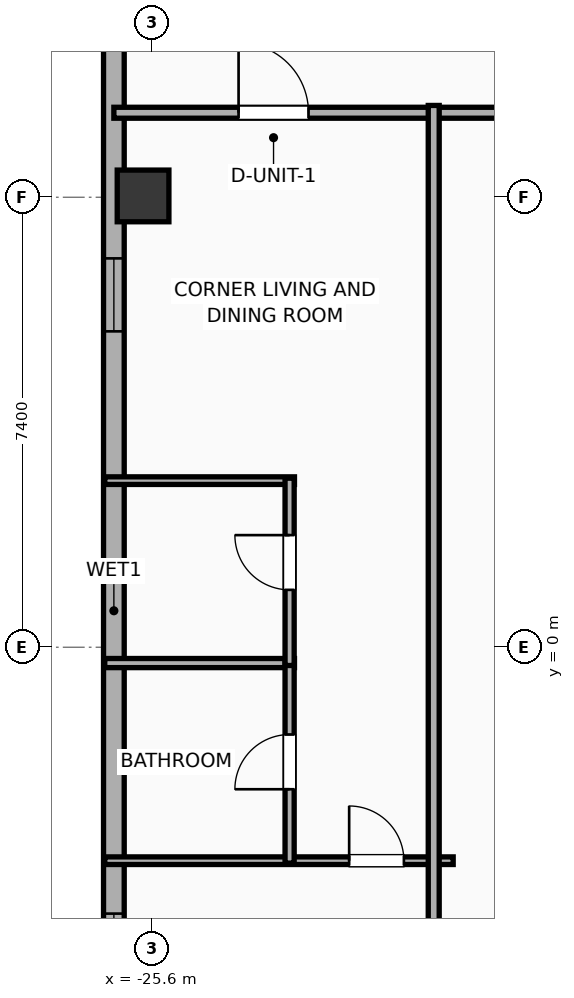
"""IFC4 building model, lengths in metres.
Left out: names, types, materials, properties, quantities, classifications, styles, units other than length and angle.
Written with IfcOpenShell. Run it as: python <this file> out.ifc"""

import sys

from ifc_helpers import new_model, si_unit, direction, frame, frame_2d, origin, origin_2d, place, context, subcontext, project, spatial, rectangle, hollow_rectangle, extrude, element, fill, save


model = new_model("IFC4")
c1 = context("Model", 3, precision=1e-05, world=origin(), true_north=direction((0.0, 1.0)))
c2 = subcontext(c1, "Body", "Model", "MODEL_VIEW")
j1 = project(units=[si_unit("LENGTHUNIT", "METRE"), si_unit("PLANEANGLEUNIT", "RADIAN")], contexts=[c1])
p1 = place(None, origin())
s1 = spatial("IfcSite", under=j1, at=p1, CompositionType="ELEMENT")
p2 = place(p1, origin())
s2 = spatial("IfcBuilding", under=s1, at=p2, CompositionType="ELEMENT")
p3 = place(p2, frame((0.0, 0.0, 208.0)))
s3 = spatial("IfcBuildingStorey", under=s2, at=p3, CompositionType="ELEMENT", Elevation=208.0)
p4 = place(p3, frame((-25.75, 7.422, 0.0), z_axis=(0.0, 0.0, 1.0), x_axis=(1.0, 0.0, 0.0)))
e1 = element("IfcColumn", 1, at=p4, inside=s3, PredefinedType="COLUMN", context=c2, shape_type="SweptSolid", body=[
    extrude(hollow_rectangle(XDim=0.85, YDim=0.85, WallThickness=0.028, at=origin_2d()), origin(), (0.0, 0.0, 1.0), 3.9),
])
p5 = place(p3, frame((-26.23, -15.383, 0.0), z_axis=(0.0, 0.0, 1.0), x_axis=(0.0, 1.0, 0.0)))
e2 = element("IfcWall", 2, at=p5, inside=s3, PredefinedType="ELEMENTEDWALL", context=c2, shape_type="SweptSolid", body=[
    extrude(rectangle(XDim=31.967, YDim=0.34, at=frame_2d((15.983, 0.0))), origin(), (0.0, 0.0, 1.0), 3.65),
])
p6 = place(p5, frame((29.415, 0.0, 0.75)))
e3 = element("IfcOpeningElement", 3, at=p6, cuts=e2, PredefinedType="OPENING", context=c2, shape_type="SweptSolid", body=[
    extrude(rectangle(XDim=1.2, YDim=2.05, at=frame_2d((0.6, 1.025))), frame((0.0, 0.18, 0.0), z_axis=(0.0, -1.0, 0.0), x_axis=(1.0, 0.0, 0.0)), (0.0, 0.0, 1.0), 0.36),
])
p7 = place(p5, frame((20.578, 0.0, 0.75)))
e4 = element("IfcOpeningElement", 4, at=p7, cuts=e2, PredefinedType="OPENING", context=c2, shape_type="SweptSolid", body=[
    extrude(rectangle(XDim=1.2, YDim=2.05, at=frame_2d((0.6, 1.025))), frame((0.0, 0.18, 0.0), z_axis=(0.0, -1.0, 0.0), x_axis=(1.0, 0.0, 0.0)), (0.0, 0.0, 1.0), 0.36),
])
p8 = place(p5, frame((9.803, 0.0, 0.75)))
e5 = element("IfcOpeningElement", 5, at=p8, cuts=e2, PredefinedType="OPENING", context=c2, shape_type="SweptSolid", body=[
    extrude(rectangle(XDim=1.2, YDim=2.05, at=frame_2d((0.6, 1.025))), frame((0.0, 0.18, 0.0), z_axis=(0.0, -1.0, 0.0), x_axis=(1.0, 0.0, 0.0)), (0.0, 0.0, 1.0), 0.36),
])
p9 = place(p3, frame((-26.23, 8.79, 0.0), z_axis=(0.0, 0.0, 1.0), x_axis=(1.0, 0.0, 0.0)))
e6 = element("IfcWall", 6, at=p9, inside=s3, PredefinedType="PARTITIONING", context=c2, shape_type="SweptSolid", body=[
    extrude(rectangle(XDim=16.35, YDim=0.18, at=frame_2d((8.175, 0.0))), origin(), (0.0, 0.0, 1.0), 3.65),
])
p10 = place(p9, frame((2.051, 0.0, 0.0)))
e7 = element("IfcOpeningElement", 7, at=p10, cuts=e6, PredefinedType="OPENING", context=c2, shape_type="SweptSolid", body=[
    extrude(rectangle(XDim=1.15, YDim=2.05, at=frame_2d((0.575, 1.025))), frame((0.0, 0.1, 0.0), z_axis=(0.0, -1.0, 0.0), x_axis=(1.0, 0.0, 0.0)), (0.0, 0.0, 1.0), 0.2),
])
p11 = place(p3, frame((-26.38, 2.74, 0.0), z_axis=(0.0, 0.0, 1.0), x_axis=(1.0, 0.0, 0.0)))
e8 = element("IfcWall", 8, at=p11, inside=s3, PredefinedType="PARTITIONING", context=c2, shape_type="SweptSolid", body=[
    extrude(rectangle(XDim=3.12, YDim=0.125, at=frame_2d((1.56, 0.0))), origin(), (0.0, 0.0, 1.0), 3.65),
])
p12 = place(p3, frame((-26.38, -0.26, 0.0), z_axis=(0.0, 0.0, 1.0), x_axis=(1.0, 0.0, 0.0)))
e9 = element("IfcWall", 9, at=p12, inside=s3, PredefinedType="PLUMBINGWALL", context=c2, shape_type="SweptSolid", body=[
    extrude(rectangle(XDim=3.12, YDim=0.15, at=frame_2d((1.56, 0.0))), origin(), (0.0, 0.0, 1.0), 3.65),
])
p13 = place(p3, frame((-26.38, -3.51, 0.0), z_axis=(0.0, 0.0, 1.0), x_axis=(1.0, 0.0, 0.0)))
e10 = element("IfcWall", 10, at=p13, inside=s3, PredefinedType="PARTITIONING", context=c2, shape_type="SweptSolid", body=[
    extrude(rectangle(XDim=5.73, YDim=0.125, at=frame_2d((2.865, 0.0))), origin(), (0.0, 0.0, 1.0), 3.65),
])
p14 = place(p13, frame((4.019, 0.0, 0.0)))
e11 = element("IfcOpeningElement", 11, at=p14, cuts=e10, PredefinedType="OPENING", context=c2, shape_type="SweptSolid", body=[
    extrude(rectangle(XDim=0.9, YDim=2.05, at=frame_2d((0.45, 1.025))), frame((0.0, 0.073, 0.0), z_axis=(0.0, -1.0, 0.0), x_axis=(1.0, 0.0, 0.0)), (0.0, 0.0, 1.0), 0.145),
])
p15 = place(p3, frame((-23.34, -3.55, 0.0), z_axis=(0.0, 0.0, 1.0), x_axis=(0.0, 1.0, 0.0)))
e12 = element("IfcWall", 12, at=p15, inside=s3, PredefinedType="PLUMBINGWALL", context=c2, shape_type="SweptSolid", body=[
    extrude(rectangle(XDim=3.33, YDim=0.15, at=frame_2d((1.665, 0.0))), origin(), (0.0, 0.0, 1.0), 3.65),
])
p16 = place(p15, frame((1.215, 0.0, 0.0)))
e13 = element("IfcOpeningElement", 13, at=p16, cuts=e12, PredefinedType="OPENING", context=c2, shape_type="SweptSolid", body=[
    extrude(rectangle(XDim=0.9, YDim=2.05, at=frame_2d((0.45, 1.025))), frame((0.0, 0.085, 0.0), z_axis=(0.0, -1.0, 0.0), x_axis=(1.0, 0.0, 0.0)), (0.0, 0.0, 1.0), 0.17),
])
p17 = place(p3, frame((-23.34, -0.3, 0.0), z_axis=(0.0, 0.0, 1.0), x_axis=(0.0, 1.0, 0.0)))
e14 = element("IfcWall", 14, at=p17, inside=s3, PredefinedType="PLUMBINGWALL", context=c2, shape_type="SweptSolid", body=[
    extrude(rectangle(XDim=3.08, YDim=0.15, at=frame_2d((1.54, 0.0))), origin(), (0.0, 0.0, 1.0), 3.65),
])
p18 = place(p17, frame((1.244, 0.0, 0.0)))
e15 = element("IfcOpeningElement", 15, at=p18, cuts=e14, PredefinedType="OPENING", context=c2, shape_type="SweptSolid", body=[
    extrude(rectangle(XDim=0.9, YDim=2.05, at=frame_2d((0.45, 1.025))), frame((0.0, 0.085, 0.0), z_axis=(0.0, -1.0, 0.0), x_axis=(1.0, 0.0, 0.0)), (0.0, 0.0, 1.0), 0.17),
])
p19 = place(p3, frame((-20.97, -8.91, 0.0), z_axis=(0.0, 0.0, 1.0), x_axis=(0.0, 1.0, 0.0)))
e16 = element("IfcWall", 16, at=p19, inside=s3, PredefinedType="PARTITIONING", context=c2, shape_type="SweptSolid", body=[
    extrude(rectangle(XDim=17.82, YDim=0.18, at=frame_2d((8.91, 0.0))), origin(), (0.0, 0.0, 1.0), 3.65),
])
p20 = place(p7, origin())
e17 = element("IfcWindow", 17, at=p20, inside=s3, PartitioningType="SINGLE_PANEL", PredefinedType="WINDOW", context=c2, shape_type="SweptSolid", body=[
    extrude(rectangle(XDim=1.2, YDim=2.05, at=frame_2d((0.6, 1.025))), frame((0.0, 0.03, 0.0), z_axis=(0.0, -1.0, 0.0), x_axis=(1.0, 0.0, 0.0)), (0.0, 0.0, 1.0), 0.06),
])
fill(e4, e17)
p21 = place(p8, origin())
e18 = element("IfcWindow", 18, at=p21, inside=s3, PartitioningType="SINGLE_PANEL", PredefinedType="WINDOW", context=c2, shape_type="SweptSolid", body=[
    extrude(rectangle(XDim=1.2, YDim=2.05, at=frame_2d((0.6, 1.025))), frame((0.0, 0.03, 0.0), z_axis=(0.0, -1.0, 0.0), x_axis=(1.0, 0.0, 0.0)), (0.0, 0.0, 1.0), 0.06),
])
fill(e5, e18)
p22 = place(p10, origin())
e19 = element("IfcDoor", 19, at=p22, inside=s3, OperationType="SINGLE_SWING_LEFT", PredefinedType="DOOR", context=c2, shape_type="SweptSolid", body=[
    extrude(rectangle(XDim=1.15, YDim=2.05, at=frame_2d((0.575, 1.025))), frame((0.0, 0.025, 0.0), z_axis=(0.0, -1.0, 0.0), x_axis=(1.0, 0.0, 0.0)), (0.0, 0.0, 1.0), 0.05),
])
fill(e7, e19)
p23 = place(p14, origin())
e20 = element("IfcDoor", 20, at=p23, inside=s3, OperationType="SINGLE_SWING_LEFT", PredefinedType="DOOR", context=c2, shape_type="SweptSolid", body=[
    extrude(rectangle(XDim=0.9, YDim=2.05, at=frame_2d((0.45, 1.025))), frame((0.0, 0.025, 0.0), z_axis=(0.0, -1.0, 0.0), x_axis=(1.0, 0.0, 0.0)), (0.0, 0.0, 1.0), 0.05),
])
fill(e11, e20)
p24 = place(p16, origin())
e21 = element("IfcDoor", 21, at=p24, inside=s3, OperationType="SINGLE_SWING_LEFT", PredefinedType="DOOR", context=c2, shape_type="SweptSolid", body=[
    extrude(rectangle(XDim=0.9, YDim=2.05, at=frame_2d((0.45, 1.025))), frame((0.0, 0.025, 0.0), z_axis=(0.0, -1.0, 0.0), x_axis=(1.0, 0.0, 0.0)), (0.0, 0.0, 1.0), 0.05),
])
fill(e13, e21)
p25 = place(p18, origin())
e22 = element("IfcDoor", 22, at=p25, inside=s3, OperationType="SINGLE_SWING_RIGHT", PredefinedType="DOOR", context=c2, shape_type="SweptSolid", body=[
    extrude(rectangle(XDim=0.9, YDim=2.05, at=frame_2d((0.45, 1.025))), frame((0.0, 0.025, 0.0), z_axis=(0.0, -1.0, 0.0), x_axis=(1.0, 0.0, 0.0)), (0.0, 0.0, 1.0), 0.05),
])
fill(e15, e22)
save(model, sys.argv[1])
